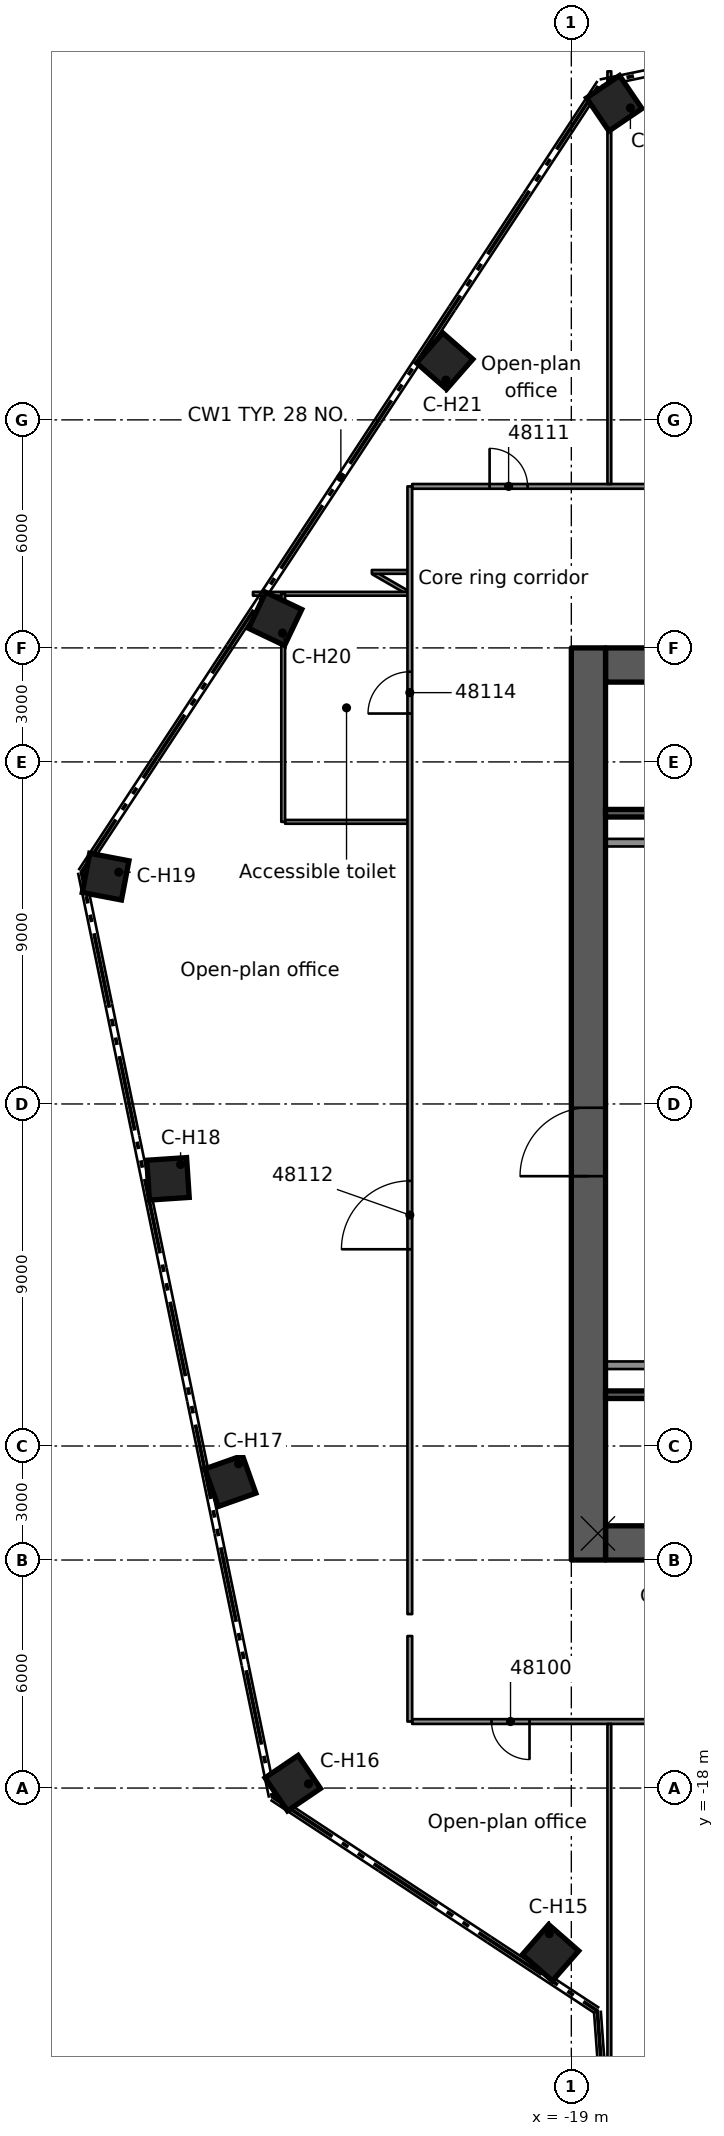
"""IFC4 building model, lengths in metres.
Left out: names, types, materials, properties, quantities, classifications, styles, units other than length and angle.
Written with IfcOpenShell. Run it as: python <this file> out.ifc"""

import sys

from ifc_helpers import new_model, si_unit, direction, frame, frame_2d, origin, origin_2d, place, context, subcontext, project, spatial, rectangle, extrude, element, fill, save


model = new_model("IFC4")
c1 = context("Model", 3, precision=1e-05, world=origin(), true_north=direction((0.0, 1.0)))
c2 = subcontext(c1, "Body", "Model", "MODEL_VIEW")
j1 = project(units=[si_unit("LENGTHUNIT", "METRE"), si_unit("PLANEANGLEUNIT", "RADIAN")], contexts=[c1])
p1 = place(None, origin())
s1 = spatial("IfcSite", under=j1, at=p1, CompositionType="ELEMENT")
p2 = place(p1, origin())
s2 = spatial("IfcBuilding", under=s1, at=p2, CompositionType="ELEMENT")
p3 = place(p2, frame((0.0, 0.0, 235.5)))
s3 = spatial("IfcBuildingStorey", under=s2, at=p3, CompositionType="ELEMENT", Elevation=235.5)
p4 = place(p3, frame((-18.1, 11.55, 0.0), z_axis=(0.0, 0.0, 1.0), x_axis=(1.0, 0.0, 0.0)))
e1 = element("IfcWall", 1, at=p4, inside=s3, PredefinedType="SHEAR", context=c2, shape_type="SweptSolid", body=[
    extrude(rectangle(XDim=9.2, YDim=0.9, at=frame_2d((4.6, 0.0))), origin(), (0.0, 0.0, 1.0), 3.5),
])
p5 = place(p4, frame((5.1, 0.0, 0.0)))
e2 = element("IfcOpeningElement", 2, at=p5, cuts=e1, PredefinedType="OPENING", context=c2, shape_type="SweptSolid", body=[
    extrude(rectangle(XDim=1.1, YDim=2.1, at=frame_2d((0.55, 1.05))), frame((0.0, 0.46, 0.0), z_axis=(0.0, -1.0, 0.0), x_axis=(1.0, 0.0, 0.0)), (0.0, 0.0, 1.0), 0.92),
])
p6 = place(p3, frame((-18.1, -11.55, 0.0), z_axis=(0.0, 0.0, 1.0), x_axis=(1.0, 0.0, 0.0)))
e3 = element("IfcWall", 3, at=p6, inside=s3, PredefinedType="SHEAR", context=c2, shape_type="SweptSolid", body=[
    extrude(rectangle(XDim=9.2, YDim=0.9, at=frame_2d((4.6, 0.0))), origin(), (0.0, 0.0, 1.0), 3.5),
])
p7 = place(p6, frame((5.1, 0.0, 0.0)))
e4 = element("IfcOpeningElement", 4, at=p7, cuts=e3, PredefinedType="OPENING", context=c2, shape_type="SweptSolid", body=[
    extrude(rectangle(XDim=1.1, YDim=2.1, at=frame_2d((0.55, 1.05))), frame((0.0, 0.46, 0.0), z_axis=(0.0, -1.0, 0.0), x_axis=(1.0, 0.0, 0.0)), (0.0, 0.0, 1.0), 0.92),
])
p8 = place(p3, frame((-18.55, -12.0, 0.0), z_axis=(0.0, 0.0, 1.0), x_axis=(0.0, 1.0, 0.0)))
e5 = element("IfcWall", 5, at=p8, inside=s3, PredefinedType="SHEAR", context=c2, shape_type="SweptSolid", body=[
    extrude(rectangle(XDim=24.0, YDim=0.9, at=frame_2d((12.0, 0.0))), origin(), (0.0, 0.0, 1.0), 3.5),
])
p9 = place(p8, frame((10.1, 0.0, 0.0)))
e6 = element("IfcOpeningElement", 6, at=p9, cuts=e5, PredefinedType="OPENING", context=c2, shape_type="SweptSolid", body=[
    extrude(rectangle(XDim=1.8, YDim=2.1, at=frame_2d((0.9, 1.05))), frame((0.0, 0.46, 0.0), z_axis=(0.0, -1.0, 0.0), x_axis=(1.0, 0.0, 0.0)), (0.0, 0.0, 1.0), 0.92),
])
for number, where, z_axis, x_axis in (
    (7, (-19.547, -22.333, 0.0), (0.0, 0.0, 1.0), (-0.659, -0.752, 0.0)),
    (8, (-26.33, -17.871, 0.0), (0.0, 0.0, 1.0), (-0.827, -0.562, 0.0)),
    (9, (-27.972, -9.921, 0.0), (0.0, 0.0, 1.0), (-0.942, -0.334, 0.0)),
    (10, (-29.613, -1.97, 0.0), (0.0, 0.0, 1.0), (-0.998, -0.066, 0.0)),
    (11, (-31.255, 5.981, 0.0), (0.0, 0.0, 1.0), (-0.982, 0.188, 0.0)),
    (12, (-26.794, 12.764, 0.0), (0.0, 0.0, 1.0), (-0.903, 0.43, 0.0)),
    (13, (-22.333, 19.547, 0.0), (0.0, 0.0, 1.0), (-0.752, 0.659, 0.0)),
    (14, (-17.871, 26.33, 0.0), (0.0, 0.0, 1.0), (-0.562, 0.827, 0.0)),
):
    element("IfcColumn", number, at=place(p3, frame(where, z_axis=z_axis, x_axis=x_axis)), inside=s3, PredefinedType="COLUMN", context=c2, shape_type="SweptSolid", body=[
        extrude(rectangle(XDim=1.05, YDim=1.05, at=origin_2d()), origin(), (0.0, 0.0, 1.0), 3.5),
    ])
for number, where, z_axis, x_axis in (
    (15, (-11.54, 6.875, 0.0), (0.0, 0.0, 1.0), (-1.0, 0.0, 0.0)),
    (16, (-11.54, -6.875, 0.0), (0.0, 0.0, 1.0), (-1.0, 0.0, 0.0)),
    (17, (-11.54, 7.65, 0.0), (0.0, 0.0, 1.0), (-1.0, 0.0, 0.0)),
    (18, (-11.54, -7.65, 0.0), (0.0, 0.0, 1.0), (-1.0, 0.0, 0.0)),
):
    element("IfcWall", number, at=place(p3, frame(where, z_axis=z_axis, x_axis=x_axis)), inside=s3, PredefinedType="SOLIDWALL", context=c2, shape_type="SweptSolid", body=[
        extrude(rectangle(XDim=6.56, YDim=0.2, at=frame_2d((3.28, 0.0))), origin(), (0.0, 0.0, 1.0), 3.09),
    ])
p10 = place(p3, frame((-24.206, 13.975, 0.0), z_axis=(0.0, 0.0, 1.0), x_axis=(0.866136921896, -0.4998067952, 0.0)))
e19 = element("IfcWall", 19, at=p10, inside=s3, PredefinedType="PARTITIONING", context=c2, shape_type="SweptSolid", body=[
    extrude(rectangle(XDim=1.002, YDim=0.1, at=frame_2d((0.501, 0.0))), origin(), (0.0, 0.0, 1.0), 3.08),
])
p11 = place(p3, frame((-12.91, -16.25, 0.0), z_axis=(0.0, 0.0, 1.0), x_axis=(-1.0, 0.0, 0.0)))
e20 = element("IfcWall", 20, at=p11, inside=s3, PredefinedType="PARTITIONING", context=c2, shape_type="SweptSolid", body=[
    extrude(rectangle(XDim=10.278, YDim=0.125, at=frame_2d((5.139, 0.0))), origin(), (0.0, 0.0, 1.0), 3.08),
])
p12 = place(p11, frame((7.19, 0.0, 0.0)))
e21 = element("IfcOpeningElement", 21, at=p12, cuts=e20, PredefinedType="OPENING", context=c2, shape_type="SweptSolid", body=[
    extrude(rectangle(XDim=1.0, YDim=2.1, at=frame_2d((0.5, 1.05))), frame((0.0, 0.073, 0.0), z_axis=(0.0, -1.0, 0.0), x_axis=(1.0, 0.0, 0.0)), (0.0, 0.0, 1.0), 0.145),
])
p13 = place(p11, frame((1.949, 0.0, 0.0)))
e22 = element("IfcOpeningElement", 22, at=p13, cuts=e20, PredefinedType="OPENING", context=c2, shape_type="SweptSolid", body=[
    extrude(rectangle(XDim=0.9, YDim=2.1, at=frame_2d((0.45, 1.05))), frame((0.0, 0.073, 0.0), z_axis=(0.0, -1.0, 0.0), x_axis=(1.0, 0.0, 0.0)), (0.0, 0.0, 1.0), 0.145),
])
p14 = place(p3, frame((-26.532, 7.423, 0.0), z_axis=(0.0, 0.0, 1.0), x_axis=(1.0, 0.0, 0.0)))
e23 = element("IfcWall", 23, at=p14, inside=s3, PredefinedType="PARTITIONING", context=c2, shape_type="SweptSolid", body=[
    extrude(rectangle(XDim=3.22, YDim=0.1, at=frame_2d((1.61, 0.0))), origin(), (0.0, 0.0, 1.0), 3.08),
])
p15 = place(p3, frame((-27.377, 13.424, 0.0), z_axis=(0.0, 0.0, 1.0), x_axis=(1.0, 0.0, 0.0)))
e24 = element("IfcWall", 24, at=p15, inside=s3, PredefinedType="PARTITIONING", context=c2, shape_type="SweptSolid", body=[
    extrude(rectangle(XDim=4.063, YDim=0.1, at=frame_2d((2.031, 0.0))), origin(), (0.0, 0.0, 1.0), 3.08),
])
p16 = place(p3, frame((-24.249, 14.0, 0.0), z_axis=(0.0, 0.0, 1.0), x_axis=(1.0, 0.0, 0.0)))
e25 = element("IfcWall", 25, at=p16, inside=s3, PredefinedType="PARTITIONING", context=c2, shape_type="SweptSolid", body=[
    extrude(rectangle(XDim=0.937, YDim=0.1, at=frame_2d((0.469, 0.0))), origin(), (0.0, 0.0, 1.0), 3.08),
])
p17 = place(p3, frame((-23.188, 16.25, 0.0), z_axis=(0.0, 0.0, 1.0), x_axis=(1.0, 0.0, 0.0)))
e26 = element("IfcWall", 26, at=p17, inside=s3, PredefinedType="PARTITIONING", context=c2, shape_type="SweptSolid", body=[
    extrude(rectangle(XDim=10.429, YDim=0.125, at=frame_2d((5.214, 0.0))), origin(), (0.0, 0.0, 1.0), 3.08),
])
p18 = place(p17, frame((2.038, 0.0, 0.0)))
e27 = element("IfcOpeningElement", 27, at=p18, cuts=e26, PredefinedType="OPENING", context=c2, shape_type="SweptSolid", body=[
    extrude(rectangle(XDim=1.0, YDim=2.1, at=frame_2d((0.5, 1.05))), frame((0.0, 0.073, 0.0), z_axis=(0.0, -1.0, 0.0), x_axis=(1.0, 0.0, 0.0)), (0.0, 0.0, 1.0), 0.145),
])
p19 = place(p3, frame((-18.0, -26.117, 0.0), z_axis=(0.0, 0.0, 1.0), x_axis=(0.0, 1.0, 0.0)))
e28 = element("IfcWall", 28, at=p19, inside=s3, PredefinedType="PARTITIONING", context=c2, shape_type="SweptSolid", body=[
    extrude(rectangle(XDim=9.805, YDim=0.1, at=frame_2d((4.902, 0.0))), origin(), (0.0, 0.0, 1.0), 3.08),
])
p20 = place(p3, frame((-18.0, 16.312, 0.0), z_axis=(0.0, 0.0, 1.0), x_axis=(0.0, 1.0, 0.0)))
e29 = element("IfcWall", 29, at=p20, inside=s3, PredefinedType="PARTITIONING", context=c2, shape_type="SweptSolid", body=[
    extrude(rectangle(XDim=10.859, YDim=0.1, at=frame_2d((5.429, 0.0))), origin(), (0.0, 0.0, 1.0), 3.08),
])
p21 = place(p3, frame((-23.25, -16.25, 0.0), z_axis=(0.0, 0.0, 1.0), x_axis=(0.0, 1.0, 0.0)))
e30 = element("IfcWall", 30, at=p21, inside=s3, PredefinedType="PARTITIONING", context=c2, shape_type="SweptSolid", body=[
    extrude(rectangle(XDim=2.25, YDim=0.125, at=frame_2d((1.125, 0.0))), origin(), (0.0, 0.0, 1.0), 3.08),
])
p22 = place(p3, frame((-23.25, -13.423, 0.0), z_axis=(0.0, 0.0, 1.0), x_axis=(0.0, 1.0, 0.0)))
e31 = element("IfcWall", 31, at=p22, inside=s3, PredefinedType="PARTITIONING", context=c2, shape_type="SweptSolid", body=[
    extrude(rectangle(XDim=29.673, YDim=0.125, at=frame_2d((14.836, 0.0))), origin(), (0.0, 0.0, 1.0), 3.08),
])
p23 = place(p22, frame((9.6, 0.0, 0.0)))
e32 = element("IfcOpeningElement", 32, at=p23, cuts=e31, PredefinedType="OPENING", context=c2, shape_type="SweptSolid", body=[
    extrude(rectangle(XDim=1.8, YDim=2.1, at=frame_2d((0.9, 1.05))), frame((0.0, 0.073, 0.0), z_axis=(0.0, -1.0, 0.0), x_axis=(1.0, 0.0, 0.0)), (0.0, 0.0, 1.0), 0.145),
])
p24 = place(p22, frame((23.696, 0.0, 0.0)))
e33 = element("IfcOpeningElement", 33, at=p24, cuts=e31, PredefinedType="OPENING", context=c2, shape_type="SweptSolid", body=[
    extrude(rectangle(XDim=1.1, YDim=2.1, at=frame_2d((0.55, 1.05))), frame((0.0, 0.073, 0.0), z_axis=(0.0, -1.0, 0.0), x_axis=(1.0, 0.0, 0.0)), (0.0, 0.0, 1.0), 0.145),
])
p25 = place(p3, frame((-26.582, 7.423, 0.0), z_axis=(0.0, 0.0, 1.0), x_axis=(0.0, 1.0, 0.0)))
e34 = element("IfcWall", 34, at=p25, inside=s3, PredefinedType="PARTITIONING", context=c2, shape_type="SweptSolid", body=[
    extrude(rectangle(XDim=6.0, YDim=0.1, at=frame_2d((3.0, 0.0))), origin(), (0.0, 0.0, 1.0), 3.08),
])
p26 = place(p9, origin())
e35 = element("IfcDoor", 35, at=p26, inside=s3, OperationType="SINGLE_SWING_LEFT", PredefinedType="DOOR", context=c2, shape_type="SweptSolid", body=[
    extrude(rectangle(XDim=1.8, YDim=2.1, at=frame_2d((0.9, 1.05))), frame((0.0, 0.025, 0.0), z_axis=(0.0, -1.0, 0.0), x_axis=(1.0, 0.0, 0.0)), (0.0, 0.0, 1.0), 0.05),
])
fill(e6, e35)
p27 = place(p12, origin())
e36 = element("IfcDoor", 36, at=p27, inside=s3, OperationType="SINGLE_SWING_RIGHT", PredefinedType="DOOR", context=c2, shape_type="SweptSolid", body=[
    extrude(rectangle(XDim=1.0, YDim=2.1, at=frame_2d((0.5, 1.05))), frame((0.0, 0.025, 0.0), z_axis=(0.0, -1.0, 0.0), x_axis=(1.0, 0.0, 0.0)), (0.0, 0.0, 1.0), 0.05),
])
fill(e21, e36)
p28 = place(p18, origin())
e37 = element("IfcDoor", 37, at=p28, inside=s3, OperationType="SINGLE_SWING_LEFT", PredefinedType="DOOR", context=c2, shape_type="SweptSolid", body=[
    extrude(rectangle(XDim=1.0, YDim=2.1, at=frame_2d((0.5, 1.05))), frame((0.0, 0.025, 0.0), z_axis=(0.0, -1.0, 0.0), x_axis=(1.0, 0.0, 0.0)), (0.0, 0.0, 1.0), 0.05),
])
fill(e27, e37)
p29 = place(p23, origin())
e38 = element("IfcDoor", 38, at=p29, inside=s3, OperationType="DOUBLE_DOOR_SINGLE_SWING", PredefinedType="DOOR", context=c2, shape_type="SweptSolid", body=[
    extrude(rectangle(XDim=1.8, YDim=2.1, at=frame_2d((0.9, 1.05))), frame((0.0, 0.025, 0.0), z_axis=(0.0, -1.0, 0.0), x_axis=(1.0, 0.0, 0.0)), (0.0, 0.0, 1.0), 0.05),
])
fill(e32, e38)
p30 = place(p24, origin())
e39 = element("IfcDoor", 39, at=p30, inside=s3, OperationType="SINGLE_SWING_RIGHT", PredefinedType="DOOR", context=c2, shape_type="SweptSolid", body=[
    extrude(rectangle(XDim=1.1, YDim=2.1, at=frame_2d((0.55, 1.05))), frame((0.0, 0.025, 0.0), z_axis=(0.0, -1.0, 0.0), x_axis=(1.0, 0.0, 0.0)), (0.0, 0.0, 1.0), 0.05),
])
fill(e33, e39)
save(model, sys.argv[1])
